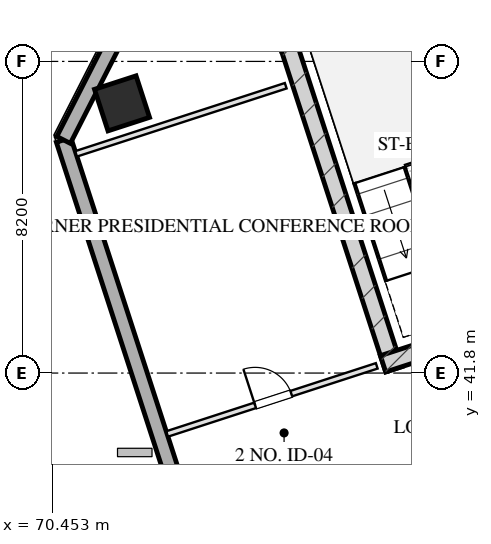
"""IFC4 building model, lengths in metres.
Left out: names, types, materials, properties, quantities, classifications, styles, units other than length and angle.
Written with IfcOpenShell. Run it as: python <this file> out.ifc"""

import sys

from ifc_helpers import new_model, si_unit, direction, frame, frame_2d, origin, origin_2d, place, context, subcontext, project, spatial, rectangle, hollow_rectangle, extrude, element, fill, save


model = new_model("IFC4")
c1 = context("Model", 3, precision=1e-05, world=origin(), true_north=direction((0.0, 1.0)))
c2 = subcontext(c1, "Body", "Model", "MODEL_VIEW")
j1 = project(units=[si_unit("LENGTHUNIT", "METRE"), si_unit("PLANEANGLEUNIT", "RADIAN")], contexts=[c1])
p1 = place(None, origin())
s1 = spatial("IfcSite", under=j1, at=p1, CompositionType="ELEMENT")
p2 = place(p1, origin())
s2 = spatial("IfcBuilding", under=s1, at=p2, CompositionType="ELEMENT")
p3 = place(p2, frame((0.0, 0.0, 237.6)))
s3 = spatial("IfcBuildingStorey", under=s2, at=p3, CompositionType="ELEMENT", Elevation=237.6)
p4 = place(p3, frame((79.442, 41.899, 0.0), z_axis=(0.0, 0.0, 1.0), x_axis=(-0.309035778627, 0.951050412717, 0.0)))
e1 = element("IfcWall", 1, at=p4, inside=s3, PredefinedType="SHEAR", context=c2, shape_type="SweptSolid", body=[
    extrude(rectangle(XDim=9.33, YDim=0.45, at=frame_2d((4.665, 0.0))), origin(), (0.0, 0.0, 1.0), 3.2),
])
p5 = place(p3, frame((79.159, 42.043, 0.0), z_axis=(0.0, 0.0, 1.0), x_axis=(0.951047485828, 0.309044785913, 0.0)))
e2 = element("IfcWall", 2, at=p5, inside=s3, PredefinedType="SHEAR", context=c2, shape_type="SweptSolid", body=[
    extrude(rectangle(XDim=4.145, YDim=0.45, at=frame_2d((2.073, 0.0))), origin(), (0.0, 0.0, 1.0), 3.2),
])
p6 = place(p3, frame((72.29, 48.896, 0.0), z_axis=(0.0, 0.0, 1.0), x_axis=(0.951056516295, 0.309016994375, 0.0)))
e3 = element("IfcColumn", 3, at=p6, inside=s3, PredefinedType="COLUMN", context=c2, shape_type="SweptSolid", body=[
    extrude(hollow_rectangle(XDim=1.15, YDim=1.15, WallThickness=0.04, at=origin_2d()), origin(), (0.0, 0.0, 1.0), 3.201),
])
p7 = place(p3, frame((82.618, 11.414, 0.0), z_axis=(0.0, 0.0, 1.0), x_axis=(-0.309016491071, 0.951056679828, 0.0)))
e4 = element("IfcWall", 4, at=p7, inside=s3, PredefinedType="SOLIDWALL", context=c2, shape_type="SweptSolid", body=[
    extrude(rectangle(XDim=38.4, YDim=0.4, at=frame_2d((19.2, 0.0))), origin(), (0.0, 0.0, 1.0), 2.36),
])
p8 = place(p7, frame((20.825, 0.0, 0.75)))
e5 = element("IfcOpeningElement", 5, at=p8, cuts=e4, PredefinedType="OPENING", context=c2, shape_type="SweptSolid", body=[
    extrude(rectangle(XDim=1.95, YDim=1.21, at=frame_2d((0.975, 0.605))), frame((0.0, 0.21, 0.0), z_axis=(0.0, -1.0, 0.0), x_axis=(1.0, 0.0, 0.0)), (0.0, 0.0, 1.0), 0.42),
])
p9 = place(p7, frame((24.625, 0.0, 0.75)))
e6 = element("IfcOpeningElement", 6, at=p9, cuts=e4, PredefinedType="OPENING", context=c2, shape_type="SweptSolid", body=[
    extrude(rectangle(XDim=1.95, YDim=1.21, at=frame_2d((0.975, 0.605))), frame((0.0, 0.21, 0.0), z_axis=(0.0, -1.0, 0.0), x_axis=(1.0, 0.0, 0.0)), (0.0, 0.0, 1.0), 0.42),
])
p10 = place(p7, frame((15.8, 0.0, 0.0)))
e7 = element("IfcOpeningElement", 7, at=p10, cuts=e4, PredefinedType="OPENING", context=c2, shape_type="SweptSolid", body=[
    extrude(rectangle(XDim=1.1, YDim=2.15, at=frame_2d((0.55, 1.075))), frame((0.0, 0.21, 0.0), z_axis=(0.0, -1.0, 0.0), x_axis=(1.0, 0.0, 0.0)), (0.0, 0.0, 1.0), 0.42),
])
p11 = place(p3, frame((70.752, 47.934, 0.0), z_axis=(0.0, 0.0, 1.0), x_axis=(0.453949291228, 0.891027519774, 0.0)))
e8 = element("IfcWall", 8, at=p11, inside=s3, PredefinedType="SOLIDWALL", context=c2, shape_type="SweptSolid", body=[
    extrude(rectangle(XDim=3.111, YDim=0.4, at=frame_2d((1.556, 0.0))), origin(), (0.0, 0.0, 1.0), 2.36),
])
p12 = place(p3, frame((71.081, 47.568, 0.0), z_axis=(0.0, 0.0, 1.0), x_axis=(0.951059431056, 0.309008023519, 0.0)))
e9 = element("IfcWall", 9, at=p12, inside=s3, PredefinedType="PARTITIONING", context=c2, shape_type="SweptSolid", body=[
    extrude(rectangle(XDim=5.8, YDim=0.15, at=frame_2d((2.9, 0.0))), origin(), (0.0, 0.0, 1.0), 2.925),
])
p13 = place(p3, frame((73.476, 40.197, 0.0), z_axis=(0.0, 0.0, 1.0), x_axis=(0.951059431056, 0.309008023519, 0.0)))
e10 = element("IfcWall", 10, at=p13, inside=s3, PredefinedType="PARTITIONING", context=c2, shape_type="SweptSolid", body=[
    extrude(rectangle(XDim=5.8, YDim=0.15, at=frame_2d((2.9, 0.0))), origin(), (0.0, 0.0, 1.0), 2.925),
])
p14 = place(p13, frame((2.436, 0.0, 0.0)))
e11 = element("IfcOpeningElement", 11, at=p14, cuts=e10, PredefinedType="OPENING", context=c2, shape_type="SweptSolid", body=[
    extrude(rectangle(XDim=1.0, YDim=2.05, at=frame_2d((0.5, 1.025))), frame((0.0, 0.085, 0.0), z_axis=(0.0, -1.0, 0.0), x_axis=(1.0, 0.0, 0.0)), (0.0, 0.0, 1.0), 0.17),
])
p15 = place(p14, origin())
e12 = element("IfcDoor", 12, at=p15, inside=s3, OperationType="SINGLE_SWING_LEFT", PredefinedType="DOOR", context=c2, shape_type="SweptSolid", body=[
    extrude(rectangle(XDim=1.0, YDim=2.05, at=frame_2d((0.5, 1.025))), frame((0.0, 0.025, 0.0), z_axis=(0.0, -1.0, 0.0), x_axis=(1.0, 0.0, 0.0)), (0.0, 0.0, 1.0), 0.05),
])
fill(e11, e12)
save(model, sys.argv[1])
